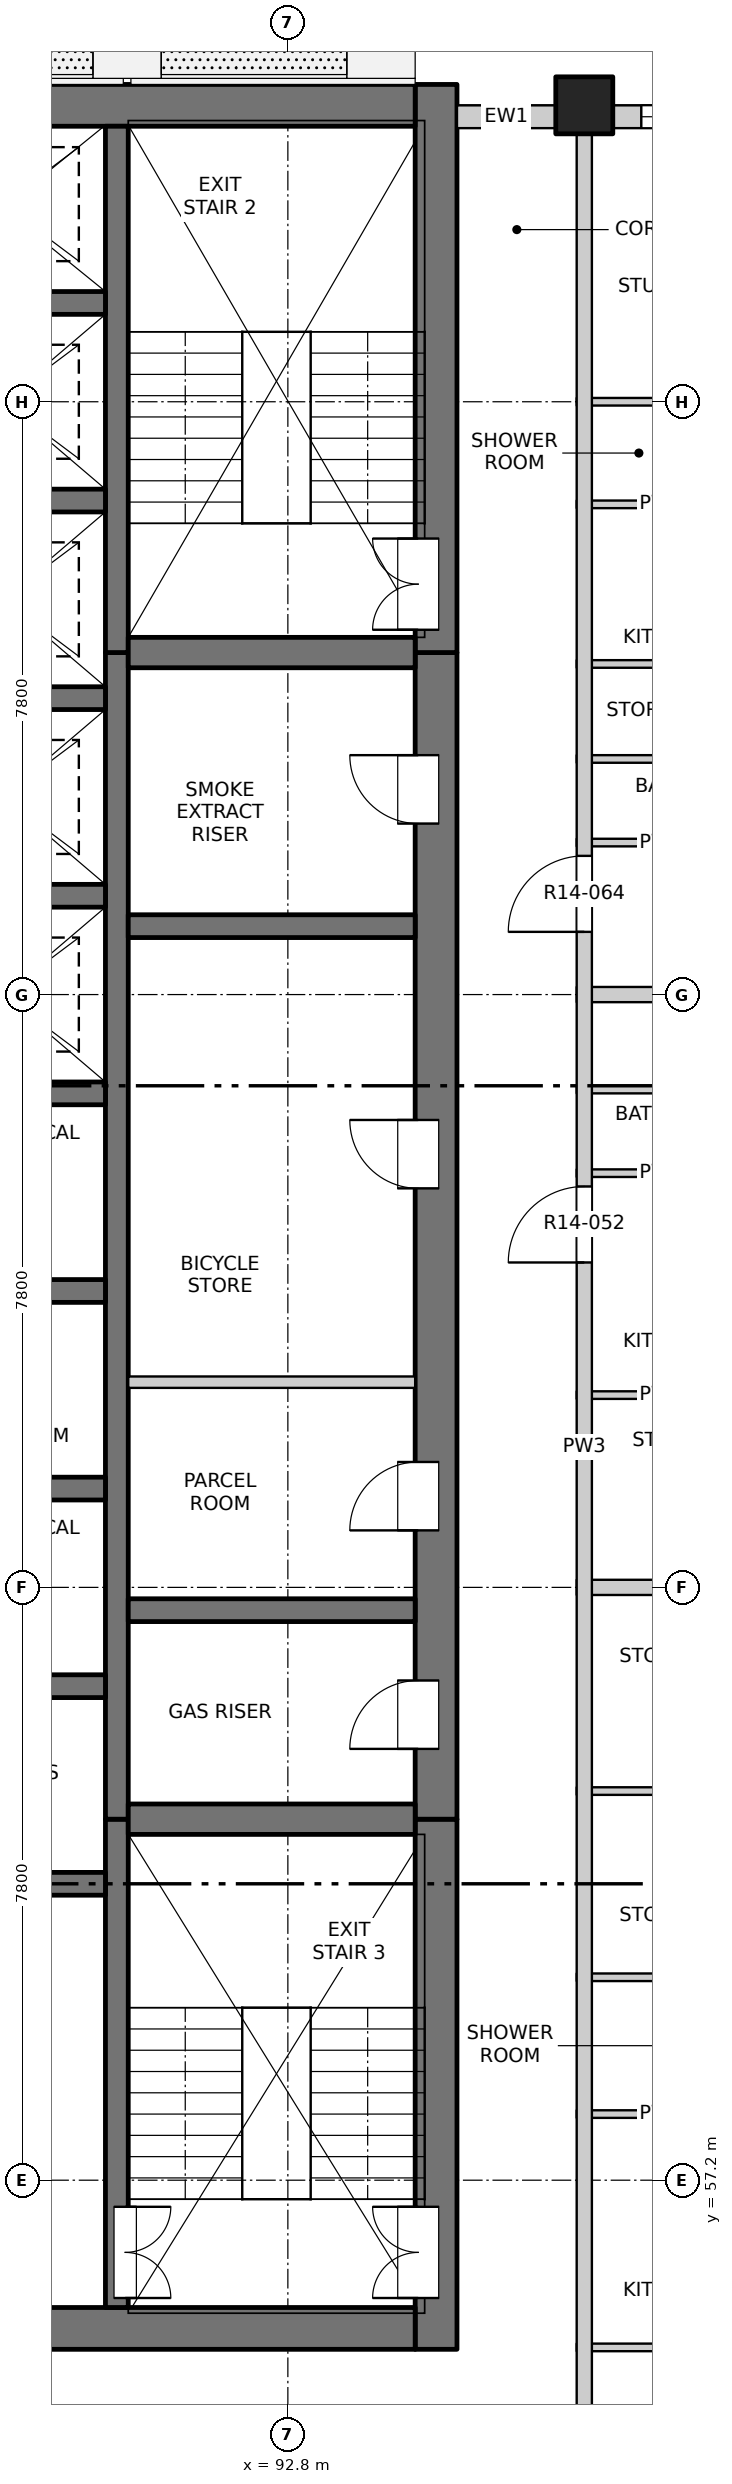
"""IFC4 building model, lengths in metres.
Left out: names, types, materials, properties, quantities, classifications, styles, units other than length and angle.
Written with IfcOpenShell. Run it as: python <this file> out.ifc"""

import sys

from ifc_helpers import new_model, si_unit, direction, frame, frame_2d, origin, origin_2d, place, context, subcontext, project, spatial, rectangle, extrude, element, fill, save


model = new_model("IFC4")
c1 = context("Model", 3, precision=1e-05, world=origin(), true_north=direction((0.0, 1.0)))
c2 = subcontext(c1, "Body", "Model", "MODEL_VIEW")
j1 = project(units=[si_unit("LENGTHUNIT", "METRE"), si_unit("PLANEANGLEUNIT", "RADIAN")], contexts=[c1])
p1 = place(None, origin())
s1 = spatial("IfcSite", under=j1, at=p1, CompositionType="ELEMENT")
p2 = place(p1, origin())
s2 = spatial("IfcBuilding", under=s1, at=p2, CompositionType="ELEMENT")
p3 = place(p2, frame((0.0, 0.0, 155.4)))
s3 = spatial("IfcBuildingStorey", under=s2, at=p3, CompositionType="ELEMENT", Elevation=155.4)
p4 = place(p3, frame((96.7, 84.5, -0.25), z_axis=(0.0, 0.0, 1.0), x_axis=(1.0, 0.0, 0.0)))
e1 = element("IfcColumn", 1, at=p4, inside=s3, PredefinedType="COLUMN", context=c2, shape_type="SweptSolid", body=[
    extrude(rectangle(XDim=0.75, YDim=0.75, at=origin_2d()), origin(), (0.0, 0.0, 1.0), 3.4),
])
p5 = place(p3, frame((94.75, 54.975, -0.25), z_axis=(0.0, 0.0, 1.0), x_axis=(0.0, 1.0, 0.0)))
e2 = element("IfcWall", 2, at=p5, inside=s3, PredefinedType="SOLIDWALL", context=c2, shape_type="SweptSolid", body=[
    extrude(rectangle(XDim=6.975, YDim=0.55, at=frame_2d((3.487, 0.0))), origin(), (0.0, 0.0, 1.0), 3.4),
])
p6 = place(p5, frame((0.675, 0.0, 0.25)))
e3 = element("IfcOpeningElement", 3, at=p6, cuts=e2, PredefinedType="OPENING", context=c2, shape_type="SweptSolid", body=[
    extrude(rectangle(XDim=1.2, YDim=2.1, at=frame_2d((0.6, 1.05))), frame((0.0, 0.285, 0.0), z_axis=(0.0, -1.0, 0.0), x_axis=(1.0, 0.0, 0.0)), (0.0, 0.0, 1.0), 0.57),
])
p7 = place(p3, frame((94.75, 61.95, -0.25), z_axis=(0.0, 0.0, 1.0), x_axis=(0.0, 1.0, 0.0)))
e4 = element("IfcWall", 4, at=p7, inside=s3, PredefinedType="SOLIDWALL", context=c2, shape_type="SweptSolid", body=[
    extrude(rectangle(XDim=15.35, YDim=0.55, at=frame_2d((7.675, 0.0))), origin(), (0.0, 0.0, 1.0), 3.4),
])
p8 = place(p7, frame((0.925, 0.0, 0.25)))
e5 = element("IfcOpeningElement", 5, at=p8, cuts=e4, PredefinedType="OPENING", context=c2, shape_type="SweptSolid", body=[
    extrude(rectangle(XDim=0.9, YDim=2.1, at=frame_2d((0.45, 1.05))), frame((0.0, 0.285, 0.0), z_axis=(0.0, -1.0, 0.0), x_axis=(1.0, 0.0, 0.0)), (0.0, 0.0, 1.0), 0.57),
])
p9 = place(p7, frame((3.8, 0.0, 0.25)))
e6 = element("IfcOpeningElement", 6, at=p9, cuts=e4, PredefinedType="OPENING", context=c2, shape_type="SweptSolid", body=[
    extrude(rectangle(XDim=0.9, YDim=2.1, at=frame_2d((0.45, 1.05))), frame((0.0, 0.285, 0.0), z_axis=(0.0, -1.0, 0.0), x_axis=(1.0, 0.0, 0.0)), (0.0, 0.0, 1.0), 0.57),
])
p10 = place(p7, frame((8.3, 0.0, 0.25)))
e7 = element("IfcOpeningElement", 7, at=p10, cuts=e4, PredefinedType="OPENING", context=c2, shape_type="SweptSolid", body=[
    extrude(rectangle(XDim=0.9, YDim=2.1, at=frame_2d((0.45, 1.05))), frame((0.0, 0.285, 0.0), z_axis=(0.0, -1.0, 0.0), x_axis=(1.0, 0.0, 0.0)), (0.0, 0.0, 1.0), 0.57),
])
p11 = place(p7, frame((13.1, 0.0, 0.25)))
e8 = element("IfcOpeningElement", 8, at=p11, cuts=e4, PredefinedType="OPENING", context=c2, shape_type="SweptSolid", body=[
    extrude(rectangle(XDim=0.9, YDim=2.1, at=frame_2d((0.45, 1.05))), frame((0.0, 0.285, 0.0), z_axis=(0.0, -1.0, 0.0), x_axis=(1.0, 0.0, 0.0)), (0.0, 0.0, 1.0), 0.57),
])
p12 = place(p3, frame((94.75, 77.3, -0.25), z_axis=(0.0, 0.0, 1.0), x_axis=(0.0, 1.0, 0.0)))
e9 = element("IfcWall", 9, at=p12, inside=s3, PredefinedType="SOLIDWALL", context=c2, shape_type="SweptSolid", body=[
    extrude(rectangle(XDim=7.475, YDim=0.55, at=frame_2d((3.737, 0.0))), origin(), (0.0, 0.0, 1.0), 3.4),
])
p13 = place(p12, frame((0.3, 0.0, 0.25)))
e10 = element("IfcOpeningElement", 10, at=p13, cuts=e9, PredefinedType="OPENING", context=c2, shape_type="SweptSolid", body=[
    extrude(rectangle(XDim=1.2, YDim=2.1, at=frame_2d((0.6, 1.05))), frame((0.0, 0.285, 0.0), z_axis=(0.0, -1.0, 0.0), x_axis=(1.0, 0.0, 0.0)), (0.0, 0.0, 1.0), 0.57),
])
p14 = place(p3, frame((75.525, 55.25, -0.25), z_axis=(0.0, 0.0, 1.0), x_axis=(1.0, 0.0, 0.0)))
e11 = element("IfcWall", 11, at=p14, inside=s3, PredefinedType="SOLIDWALL", context=c2, shape_type="SweptSolid", body=[
    extrude(rectangle(XDim=18.95, YDim=0.55, at=frame_2d((9.475, 0.0))), origin(), (0.0, 0.0, 1.0), 3.4),
])
p15 = place(p14, frame((8.725, 0.0, 0.25)))
e12 = element("IfcOpeningElement", 12, at=p15, cuts=e11, PredefinedType="OPENING", context=c2, shape_type="SweptSolid", body=[
    extrude(rectangle(XDim=1.5, YDim=2.1, at=frame_2d((0.75, 1.05))), frame((0.0, 0.285, 0.0), z_axis=(0.0, -1.0, 0.0), x_axis=(1.0, 0.0, 0.0)), (0.0, 0.0, 1.0), 0.57),
])
p16 = place(p3, frame((75.525, 84.5, -0.25), z_axis=(0.0, 0.0, 1.0), x_axis=(1.0, 0.0, 0.0)))
e13 = element("IfcWall", 13, at=p16, inside=s3, PredefinedType="SOLIDWALL", context=c2, shape_type="SweptSolid", body=[
    extrude(rectangle(XDim=18.95, YDim=0.55, at=frame_2d((9.475, 0.0))), origin(), (0.0, 0.0, 1.0), 3.4),
])
p17 = place(p3, frame((90.55, 55.525, -0.25), z_axis=(0.0, 0.0, 1.0), x_axis=(0.0, 1.0, 0.0)))
e14 = element("IfcWall", 14, at=p17, inside=s3, PredefinedType="SOLIDWALL", context=c2, shape_type="SweptSolid", body=[
    extrude(rectangle(XDim=6.425, YDim=0.3, at=frame_2d((3.212, 0.0))), origin(), (0.0, 0.0, 1.0), 3.4),
])
p18 = place(p17, frame((0.125, 0.0, 0.25)))
e15 = element("IfcOpeningElement", 15, at=p18, cuts=e14, PredefinedType="OPENING", context=c2, shape_type="SweptSolid", body=[
    extrude(rectangle(XDim=1.2, YDim=2.1, at=frame_2d((0.6, 1.05))), frame((0.0, 0.16, 0.0), z_axis=(0.0, -1.0, 0.0), x_axis=(1.0, 0.0, 0.0)), (0.0, 0.0, 1.0), 0.32),
])
p19 = place(p3, frame((90.55, 61.95, -0.25), z_axis=(0.0, 0.0, 1.0), x_axis=(0.0, 1.0, 0.0)))
e16 = element("IfcWall", 16, at=p19, inside=s3, PredefinedType="SOLIDWALL", context=c2, shape_type="SweptSolid", body=[
    extrude(rectangle(XDim=15.35, YDim=0.3, at=frame_2d((7.675, 0.0))), origin(), (0.0, 0.0, 1.0), 3.4),
])
p20 = place(p3, frame((90.55, 77.3, -0.25), z_axis=(0.0, 0.0, 1.0), x_axis=(0.0, 1.0, 0.0)))
e17 = element("IfcWall", 17, at=p20, inside=s3, PredefinedType="SOLIDWALL", context=c2, shape_type="SweptSolid", body=[
    extrude(rectangle(XDim=6.925, YDim=0.3, at=frame_2d((3.462, 0.0))), origin(), (0.0, 0.0, 1.0), 3.4),
])
for number, where, z_axis, x_axis in (
    (18, (87.4, 61.1, -0.25), (0.0, 0.0, 1.0), (1.0, 0.0, 0.0)),
    (19, (87.4, 63.7, -0.25), (0.0, 0.0, 1.0), (1.0, 0.0, 0.0)),
    (20, (87.4, 66.3, -0.25), (0.0, 0.0, 1.0), (1.0, 0.0, 0.0)),
    (21, (87.4, 68.9, -0.25), (0.0, 0.0, 1.0), (1.0, 0.0, 0.0)),
    (22, (87.4, 71.5, -0.25), (0.0, 0.0, 1.0), (1.0, 0.0, 0.0)),
    (23, (87.4, 74.1, -0.25), (0.0, 0.0, 1.0), (1.0, 0.0, 0.0)),
    (24, (87.4, 76.7, -0.25), (0.0, 0.0, 1.0), (1.0, 0.0, 0.0)),
    (25, (87.4, 79.3, -0.25), (0.0, 0.0, 1.0), (1.0, 0.0, 0.0)),
    (26, (87.4, 81.9, -0.25), (0.0, 0.0, 1.0), (1.0, 0.0, 0.0)),
):
    element("IfcWall", number, at=place(p3, frame(where, z_axis=z_axis, x_axis=x_axis)), inside=s3, PredefinedType="SOLIDWALL", context=c2, shape_type="SweptSolid", body=[
        extrude(rectangle(XDim=3.0, YDim=0.3, at=frame_2d((1.5, 0.0))), origin(), (0.0, 0.0, 1.0), 3.4),
    ])
p21 = place(p3, frame((90.7, 61.95, -0.25), z_axis=(0.0, 0.0, 1.0), x_axis=(1.0, 0.0, 0.0)))
e27 = element("IfcWall", 27, at=p21, inside=s3, PredefinedType="SOLIDWALL", context=c2, shape_type="SweptSolid", body=[
    extrude(rectangle(XDim=3.775, YDim=0.4, at=frame_2d((1.888, 0.0))), origin(), (0.0, 0.0, 1.0), 3.4),
])
for number, where, z_axis, x_axis in (
    (28, (90.7, 64.7, -0.25), (0.0, 0.0, 1.0), (1.0, 0.0, 0.0)),
    (29, (90.7, 73.7, -0.25), (0.0, 0.0, 1.0), (1.0, 0.0, 0.0)),
):
    element("IfcWall", number, at=place(p3, frame(where, z_axis=z_axis, x_axis=x_axis)), inside=s3, PredefinedType="SOLIDWALL", context=c2, shape_type="SweptSolid", body=[
        extrude(rectangle(XDim=3.775, YDim=0.3, at=frame_2d((1.888, 0.0))), origin(), (0.0, 0.0, 1.0), 3.4),
    ])
p22 = place(p3, frame((90.7, 77.3, -0.25), z_axis=(0.0, 0.0, 1.0), x_axis=(1.0, 0.0, 0.0)))
e30 = element("IfcWall", 30, at=p22, inside=s3, PredefinedType="SOLIDWALL", context=c2, shape_type="SweptSolid", body=[
    extrude(rectangle(XDim=3.775, YDim=0.4, at=frame_2d((1.888, 0.0))), origin(), (0.0, 0.0, 1.0), 3.4),
])
p23 = place(p3, frame((95.025, 84.35, 0.0), z_axis=(0.0, 0.0, 1.0), x_axis=(1.0, 0.0, 0.0)))
e31 = element("IfcWall", 31, at=p23, inside=s3, PredefinedType="SOLIDWALL", context=c2, shape_type="SweptSolid", body=[
    extrude(rectangle(XDim=1.3, YDim=0.3, at=frame_2d((0.65, 0.0))), origin(), (0.0, 0.0, 1.0), 2.7),
])
p24 = place(p3, frame((97.075, 84.35, 0.0), z_axis=(0.0, 0.0, 1.0), x_axis=(1.0, 0.0, 0.0)))
e32 = element("IfcWall", 32, at=p24, inside=s3, PredefinedType="SOLIDWALL", context=c2, shape_type="SweptSolid", body=[
    extrude(rectangle(XDim=3.525, YDim=0.3, at=frame_2d((1.763, 0.0))), origin(), (0.0, 0.0, 1.0), 2.7),
])
p25 = place(p24, frame((0.375, 0.0, 0.9)))
e33 = element("IfcOpeningElement", 33, at=p25, cuts=e32, PredefinedType="OPENING", context=c2, shape_type="SweptSolid", body=[
    extrude(rectangle(XDim=2.4, YDim=1.8, at=frame_2d((1.2, 0.9))), frame((0.0, 0.16, 0.0), z_axis=(0.0, -1.0, 0.0), x_axis=(1.0, 0.0, 0.0)), (0.0, 0.0, 1.0), 0.32),
])
for number, where, z_axis, x_axis in (
    (34, (96.6, 55.0, 0.0), (0.0, 0.0, 1.0), (1.0, 0.0, 0.0)),
    (35, (96.6, 58.07, 0.0), (0.0, 0.0, 1.0), (1.0, 0.0, 0.0)),
    (36, (96.6, 59.87, 0.0), (0.0, 0.0, 1.0), (1.0, 0.0, 0.0)),
    (37, (96.6, 62.32, 0.0), (0.0, 0.0, 1.0), (1.0, 0.0, 0.0)),
):
    element("IfcWall", number, at=place(p3, frame(where, z_axis=z_axis, x_axis=x_axis)), inside=s3, PredefinedType="PARTITIONING", context=c2, shape_type="SweptSolid", body=[
        extrude(rectangle(XDim=2.22, YDim=0.1, at=frame_2d((1.11, 0.0))), origin(), (0.0, 0.0, 1.0), 3.15),
    ])
p26 = place(p3, frame((96.6, 65.0, 0.0), z_axis=(0.0, 0.0, 1.0), x_axis=(1.0, 0.0, 0.0)))
e38 = element("IfcWall", 38, at=p26, inside=s3, PredefinedType="PARTITIONING", context=c2, shape_type="SweptSolid", body=[
    extrude(rectangle(XDim=7.6, YDim=0.2, at=frame_2d((3.8, 0.0))), origin(), (0.0, 0.0, 1.0), 3.15),
])
p27 = place(p3, frame((96.6, 67.53, 0.0), z_axis=(0.0, 0.0, 1.0), x_axis=(1.0, 0.0, 0.0)))
e39 = element("IfcWall", 39, at=p27, inside=s3, PredefinedType="PARTITIONING", context=c2, shape_type="SweptSolid", body=[
    extrude(rectangle(XDim=2.22, YDim=0.1, at=frame_2d((1.11, 0.0))), origin(), (0.0, 0.0, 1.0), 3.15),
])
p28 = place(p3, frame((90.7, 67.7, 0.0), z_axis=(0.0, 0.0, 1.0), x_axis=(1.0, 0.0, 0.0)))
e40 = element("IfcWall", 40, at=p28, inside=s3, PredefinedType="PARTITIONING", context=c2, shape_type="SweptSolid", body=[
    extrude(rectangle(XDim=3.775, YDim=0.15, at=frame_2d((1.887, 0.0))), origin(), (0.0, 0.0, 1.0), 3.15),
])
for number, where, z_axis, x_axis in (
    (41, (96.6, 70.45, 0.0), (0.0, 0.0, 1.0), (1.0, 0.0, 0.0)),
    (42, (96.6, 71.55, 0.0), (0.0, 0.0, 1.0), (1.0, 0.0, 0.0)),
):
    element("IfcWall", number, at=place(p3, frame(where, z_axis=z_axis, x_axis=x_axis)), inside=s3, PredefinedType="PARTITIONING", context=c2, shape_type="SweptSolid", body=[
        extrude(rectangle(XDim=2.22, YDim=0.1, at=frame_2d((1.11, 0.0))), origin(), (0.0, 0.0, 1.0), 3.15),
    ])
p29 = place(p3, frame((96.6, 72.8, 0.0), z_axis=(0.0, 0.0, 1.0), x_axis=(1.0, 0.0, 0.0)))
e43 = element("IfcWall", 43, at=p29, inside=s3, PredefinedType="PARTITIONING", context=c2, shape_type="SweptSolid", body=[
    extrude(rectangle(XDim=7.6, YDim=0.2, at=frame_2d((3.8, 0.0))), origin(), (0.0, 0.0, 1.0), 3.15),
])
for number, where, z_axis, x_axis in (
    (44, (96.6, 74.8, 0.0), (0.0, 0.0, 1.0), (1.0, 0.0, 0.0)),
    (45, (96.6, 75.9, 0.0), (0.0, 0.0, 1.0), (1.0, 0.0, 0.0)),
    (46, (96.6, 77.15, 0.0), (0.0, 0.0, 1.0), (1.0, 0.0, 0.0)),
    (47, (96.6, 79.25, 0.0), (0.0, 0.0, 1.0), (1.0, 0.0, 0.0)),
):
    element("IfcWall", number, at=place(p3, frame(where, z_axis=z_axis, x_axis=x_axis)), inside=s3, PredefinedType="PARTITIONING", context=c2, shape_type="SweptSolid", body=[
        extrude(rectangle(XDim=2.22, YDim=0.1, at=frame_2d((1.11, 0.0))), origin(), (0.0, 0.0, 1.0), 3.15),
    ])
p30 = place(p3, frame((96.6, 80.6, 0.0), z_axis=(0.0, 0.0, 1.0), x_axis=(1.0, 0.0, 0.0)))
e48 = element("IfcWall", 48, at=p30, inside=s3, PredefinedType="PARTITIONING", context=c2, shape_type="SweptSolid", body=[
    extrude(rectangle(XDim=7.6, YDim=0.1, at=frame_2d((3.8, 0.0))), origin(), (0.0, 0.0, 1.0), 3.15),
])
p31 = place(p30, frame((2.56, 0.0, 0.0)))
e49 = element("IfcOpeningElement", 49, at=p31, cuts=e48, PredefinedType="OPENING", context=c2, shape_type="SweptSolid", body=[
    extrude(rectangle(XDim=0.9, YDim=2.1, at=frame_2d((0.45, 1.05))), frame((0.0, 0.06, 0.0), z_axis=(0.0, -1.0, 0.0), x_axis=(1.0, 0.0, 0.0)), (0.0, 0.0, 1.0), 0.12),
])
p32 = place(p3, frame((96.7, 49.5, 0.0), z_axis=(0.0, 0.0, 1.0), x_axis=(0.0, 1.0, 0.0)))
e50 = element("IfcWall", 50, at=p32, inside=s3, PredefinedType="PARTITIONING", context=c2, shape_type="SweptSolid", body=[
    extrude(rectangle(XDim=34.7, YDim=0.2, at=frame_2d((17.35, 0.0))), origin(), (0.0, 0.0, 1.0), 3.15),
])
p33 = place(p32, frame((3.225, 0.0, 0.0)))
e51 = element("IfcOpeningElement", 51, at=p33, cuts=e50, PredefinedType="OPENING", context=c2, shape_type="SweptSolid", body=[
    extrude(rectangle(XDim=1.0, YDim=2.1, at=frame_2d((0.5, 1.05))), frame((0.0, 0.11, 0.0), z_axis=(0.0, -1.0, 0.0), x_axis=(1.0, 0.0, 0.0)), (0.0, 0.0, 1.0), 0.22),
])
p34 = place(p32, frame((19.775, 0.0, 0.0)))
e52 = element("IfcOpeningElement", 52, at=p34, cuts=e50, PredefinedType="OPENING", context=c2, shape_type="SweptSolid", body=[
    extrude(rectangle(XDim=1.0, YDim=2.1, at=frame_2d((0.5, 1.05))), frame((0.0, 0.11, 0.0), z_axis=(0.0, -1.0, 0.0), x_axis=(1.0, 0.0, 0.0)), (0.0, 0.0, 1.0), 0.22),
])
p35 = place(p32, frame((24.125, 0.0, 0.0)))
e53 = element("IfcOpeningElement", 53, at=p35, cuts=e50, PredefinedType="OPENING", context=c2, shape_type="SweptSolid", body=[
    extrude(rectangle(XDim=1.0, YDim=2.1, at=frame_2d((0.5, 1.05))), frame((0.0, 0.11, 0.0), z_axis=(0.0, -1.0, 0.0), x_axis=(1.0, 0.0, 0.0)), (0.0, 0.0, 1.0), 0.22),
])
p36 = place(p25, origin())
e54 = element("IfcWindow", 54, at=p36, inside=s3, PartitioningType="DOUBLE_PANEL_VERTICAL", PredefinedType="WINDOW", context=c2, shape_type="SweptSolid", body=[
    extrude(rectangle(XDim=2.4, YDim=1.8, at=frame_2d((1.2, 0.9))), frame((0.0, 0.03, 0.0), z_axis=(0.0, -1.0, 0.0), x_axis=(1.0, 0.0, 0.0)), (0.0, 0.0, 1.0), 0.06),
])
fill(e33, e54)
p37 = place(p18, origin())
e55 = element("IfcDoor", 55, at=p37, inside=s3, OperationType="DOUBLE_DOOR_SINGLE_SWING", PredefinedType="DOOR", context=c2, shape_type="SweptSolid", body=[
    extrude(rectangle(XDim=1.2, YDim=2.1, at=frame_2d((0.6, 1.05))), frame((0.0, -0.085, 0.0), z_axis=(0.0, -1.0, 0.0), x_axis=(1.0, 0.0, 0.0)), (0.0, 0.0, 1.0), 0.05),
])
fill(e15, e55)
p38 = place(p6, origin())
e56 = element("IfcDoor", 56, at=p38, inside=s3, OperationType="DOUBLE_DOOR_SINGLE_SWING", PredefinedType="DOOR", context=c2, shape_type="SweptSolid", body=[
    extrude(rectangle(XDim=1.2, YDim=2.1, at=frame_2d((0.6, 1.05))), frame((0.0, 0.26, 0.0), z_axis=(0.0, -1.0, 0.0), x_axis=(1.0, 0.0, 0.0)), (0.0, 0.0, 1.0), 0.05),
])
fill(e3, e56)
p39 = place(p8, origin())
e57 = element("IfcDoor", 57, at=p39, inside=s3, OperationType="SINGLE_SWING_LEFT", PredefinedType="DOOR", context=c2, shape_type="SweptSolid", body=[
    extrude(rectangle(XDim=0.9, YDim=2.1, at=frame_2d((0.45, 1.05))), frame((0.0, 0.26, 0.0), z_axis=(0.0, -1.0, 0.0), x_axis=(1.0, 0.0, 0.0)), (0.0, 0.0, 1.0), 0.05),
])
fill(e5, e57)
p40 = place(p9, origin())
e58 = element("IfcDoor", 58, at=p40, inside=s3, OperationType="SINGLE_SWING_LEFT", PredefinedType="DOOR", context=c2, shape_type="SweptSolid", body=[
    extrude(rectangle(XDim=0.9, YDim=2.1, at=frame_2d((0.45, 1.05))), frame((0.0, 0.26, 0.0), z_axis=(0.0, -1.0, 0.0), x_axis=(1.0, 0.0, 0.0)), (0.0, 0.0, 1.0), 0.05),
])
fill(e6, e58)
p41 = place(p34, origin())
e59 = element("IfcDoor", 59, at=p41, inside=s3, OperationType="SINGLE_SWING_RIGHT", PredefinedType="DOOR", context=c2, shape_type="SweptSolid", body=[
    extrude(rectangle(XDim=1.0, YDim=2.1, at=frame_2d((0.5, 1.05))), frame((0.0, 0.025, 0.0), z_axis=(0.0, -1.0, 0.0), x_axis=(1.0, 0.0, 0.0)), (0.0, 0.0, 1.0), 0.05),
])
fill(e52, e59)
p42 = place(p10, origin())
e60 = element("IfcDoor", 60, at=p42, inside=s3, OperationType="SINGLE_SWING_RIGHT", PredefinedType="DOOR", context=c2, shape_type="SweptSolid", body=[
    extrude(rectangle(XDim=0.9, YDim=2.1, at=frame_2d((0.45, 1.05))), frame((0.0, 0.26, 0.0), z_axis=(0.0, -1.0, 0.0), x_axis=(1.0, 0.0, 0.0)), (0.0, 0.0, 1.0), 0.05),
])
fill(e7, e60)
p43 = place(p35, origin())
e61 = element("IfcDoor", 61, at=p43, inside=s3, OperationType="SINGLE_SWING_RIGHT", PredefinedType="DOOR", context=c2, shape_type="SweptSolid", body=[
    extrude(rectangle(XDim=1.0, YDim=2.1, at=frame_2d((0.5, 1.05))), frame((0.0, 0.025, 0.0), z_axis=(0.0, -1.0, 0.0), x_axis=(1.0, 0.0, 0.0)), (0.0, 0.0, 1.0), 0.05),
])
fill(e53, e61)
p44 = place(p11, origin())
e62 = element("IfcDoor", 62, at=p44, inside=s3, OperationType="SINGLE_SWING_RIGHT", PredefinedType="DOOR", context=c2, shape_type="SweptSolid", body=[
    extrude(rectangle(XDim=0.9, YDim=2.1, at=frame_2d((0.45, 1.05))), frame((0.0, 0.26, 0.0), z_axis=(0.0, -1.0, 0.0), x_axis=(1.0, 0.0, 0.0)), (0.0, 0.0, 1.0), 0.05),
])
fill(e8, e62)
p45 = place(p13, origin())
e63 = element("IfcDoor", 63, at=p45, inside=s3, OperationType="DOUBLE_DOOR_SINGLE_SWING", PredefinedType="DOOR", context=c2, shape_type="SweptSolid", body=[
    extrude(rectangle(XDim=1.2, YDim=2.1, at=frame_2d((0.6, 1.05))), frame((0.0, 0.26, 0.0), z_axis=(0.0, -1.0, 0.0), x_axis=(1.0, 0.0, 0.0)), (0.0, 0.0, 1.0), 0.05),
])
fill(e10, e63)
save(model, sys.argv[1])
